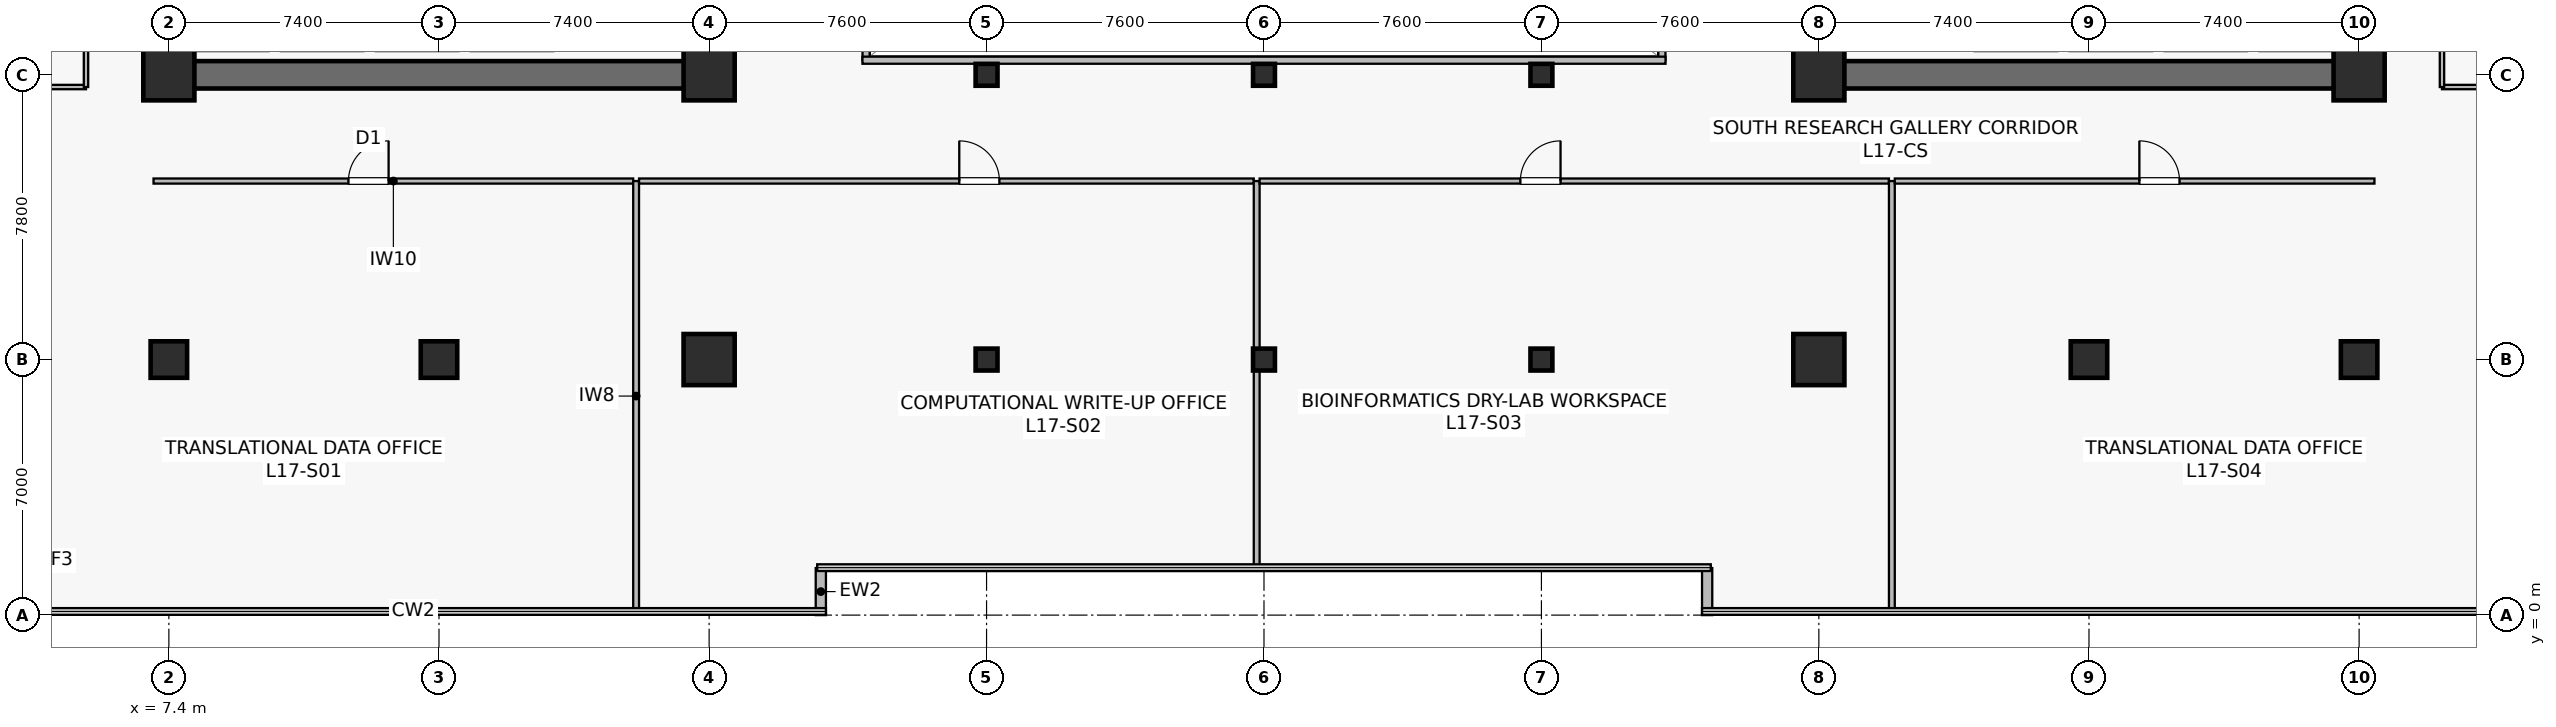
"""IFC4 building model, lengths in metres.
Left out: names, types, materials, properties, quantities, classifications, styles, units other than length and angle.
Written with IfcOpenShell. Run it as: python <this file> out.ifc"""

import sys

from ifc_helpers import new_model, si_unit, direction, frame, frame_2d, origin, origin_2d, place, context, subcontext, project, spatial, rectangle, hollow_rectangle, extrude, source, transform, mapped, element, fill, save


model = new_model("IFC4")
c1 = context("Model", 3, precision=1e-05, world=origin(), true_north=direction((0.0, 1.0)))
c2 = subcontext(c1, "Body", "Model", "MODEL_VIEW")
j1 = project(units=[si_unit("LENGTHUNIT", "METRE"), si_unit("PLANEANGLEUNIT", "RADIAN")], contexts=[c1])
p1 = place(None, origin())
s1 = spatial("IfcSite", under=j1, at=p1, CompositionType="ELEMENT")
p2 = place(p1, origin())
s2 = spatial("IfcBuilding", under=s1, at=p2, CompositionType="ELEMENT")
p3 = place(p2, frame((0.0, 0.0, 70.3)))
s3 = spatial("IfcBuildingStorey", under=s2, at=p3, CompositionType="ELEMENT", Elevation=70.3)
p4 = place(p3, frame((7.025, 14.8, 0.0), z_axis=(0.0, 0.0, 1.0), x_axis=(1.0, 0.0, 0.0)))
e1 = element("IfcWall", 1, at=p4, inside=s3, PredefinedType="SHEAR", context=c2, shape_type="SweptSolid", body=[
    extrude(rectangle(XDim=15.55, YDim=0.75, at=frame_2d((7.775, 0.0))), origin(), (0.0, 0.0, 1.0), 3.78),
])
p5 = place(p3, frame((7.4, 15.175, 0.0), z_axis=(0.0, 0.0, 1.0), x_axis=(0.0, 1.0, 0.0)))
e2 = element("IfcWall", 2, at=p5, inside=s3, PredefinedType="SHEAR", context=c2, shape_type="SweptSolid", body=[
    extrude(rectangle(XDim=18.25, YDim=0.75, at=frame_2d((9.125, 0.0))), origin(), (0.0, 0.0, 1.0), 3.78),
])
p6 = place(p3, frame((22.2, 15.175, 0.0), z_axis=(0.0, 0.0, 1.0), x_axis=(0.0, 1.0, 0.0)))
e3 = element("IfcWall", 3, at=p6, inside=s3, PredefinedType="SHEAR", context=c2, shape_type="SweptSolid", body=[
    extrude(rectangle(XDim=18.25, YDim=0.75, at=frame_2d((9.125, 0.0))), origin(), (0.0, 0.0, 1.0), 3.78),
])
p7 = place(p6, frame((3.375, 0.0, 0.0)))
e4 = element("IfcOpeningElement", 4, at=p7, cuts=e3, PredefinedType="OPENING", context=c2, shape_type="SweptSolid", body=[
    extrude(rectangle(XDim=1.42, YDim=2.2, at=frame_2d((0.71, 1.1))), frame((0.0, 0.385, 0.0), z_axis=(0.0, -1.0, 0.0), x_axis=(1.0, 0.0, 0.0)), (0.0, 0.0, 1.0), 0.77),
])
p8 = place(p3, frame((52.225, 14.8, 0.0), z_axis=(0.0, 0.0, 1.0), x_axis=(1.0, 0.0, 0.0)))
e5 = element("IfcWall", 5, at=p8, inside=s3, PredefinedType="SHEAR", context=c2, shape_type="SweptSolid", body=[
    extrude(rectangle(XDim=15.55, YDim=0.75, at=frame_2d((7.775, 0.0))), origin(), (0.0, 0.0, 1.0), 3.78),
])
p9 = place(p3, frame((52.6, 15.175, 0.0), z_axis=(0.0, 0.0, 1.0), x_axis=(0.0, 1.0, 0.0)))
e6 = element("IfcWall", 6, at=p9, inside=s3, PredefinedType="SHEAR", context=c2, shape_type="SweptSolid", body=[
    extrude(rectangle(XDim=18.25, YDim=0.75, at=frame_2d((9.125, 0.0))), origin(), (0.0, 0.0, 1.0), 3.78),
])
p10 = place(p9, frame((3.375, 0.0, 0.0)))
e7 = element("IfcOpeningElement", 7, at=p10, cuts=e6, PredefinedType="OPENING", context=c2, shape_type="SweptSolid", body=[
    extrude(rectangle(XDim=1.42, YDim=2.2, at=frame_2d((0.71, 1.1))), frame((0.0, 0.385, 0.0), z_axis=(0.0, -1.0, 0.0), x_axis=(1.0, 0.0, 0.0)), (0.0, 0.0, 1.0), 0.77),
])
p11 = place(p3, frame((67.4, 15.175, 0.0), z_axis=(0.0, 0.0, 1.0), x_axis=(0.0, 1.0, 0.0)))
e8 = element("IfcWall", 8, at=p11, inside=s3, PredefinedType="SHEAR", context=c2, shape_type="SweptSolid", body=[
    extrude(rectangle(XDim=18.25, YDim=0.75, at=frame_2d((9.125, 0.0))), origin(), (0.0, 0.0, 1.0), 3.78),
])
m1 = source(origin(), c2, "Body", "SweptSolid", [
    extrude(rectangle(XDim=1.0, YDim=1.0, at=origin_2d()), origin(), (0.0, 0.0, 1.0), 4.1),
])
p12 = place(p3, frame((14.8, 7.0, 0.0), z_axis=(0.0, 0.0, 1.0), x_axis=(1.0, 0.0, 0.0)))
e9 = element("IfcColumn", 9, at=p12, inside=s3, PredefinedType="COLUMN", context=c2, shape_type="MappedRepresentation", body=[
    mapped(m1, transform((0.0, 0.0, 0.0), scale=1.0)),
])
m2 = source(origin(), c2, "Body", "SweptSolid", [
    extrude(rectangle(XDim=1.4, YDim=1.4, at=origin_2d()), origin(), (0.0, 0.0, 1.0), 4.1),
])
for number, where, z_axis, x_axis in (
    (10, (22.2, 7.0, 0.0), (0.0, 0.0, 1.0), (1.0, 0.0, 0.0)),
    (11, (7.4, 14.8, 0.0), (0.0, 0.0, 1.0), (1.0, 0.0, 0.0)),
    (12, (22.2, 14.8, 0.0), (0.0, 0.0, 1.0), (1.0, 0.0, 0.0)),
    (13, (52.6, 7.0, 0.0), (0.0, 0.0, 1.0), (1.0, 0.0, 0.0)),
):
    element("IfcColumn", number, at=place(p3, frame(where, z_axis=z_axis, x_axis=x_axis)), inside=s3, PredefinedType="COLUMN", context=c2, shape_type="MappedRepresentation", body=[
        mapped(m2, transform((0.0, 0.0, 0.0), scale=1.0)),
    ])
p13 = place(p3, frame((60.0, 7.0, 0.0), z_axis=(0.0, 0.0, 1.0), x_axis=(1.0, 0.0, 0.0)))
e14 = element("IfcColumn", 14, at=p13, inside=s3, PredefinedType="COLUMN", context=c2, shape_type="MappedRepresentation", body=[
    mapped(m1, transform((0.0, 0.0, 0.0), scale=1.0)),
])
for number, where, z_axis, x_axis in (
    (15, (52.6, 14.8, 0.0), (0.0, 0.0, 1.0), (1.0, 0.0, 0.0)),
    (16, (67.4, 14.8, 0.0), (0.0, 0.0, 1.0), (1.0, 0.0, 0.0)),
):
    element("IfcColumn", number, at=place(p3, frame(where, z_axis=z_axis, x_axis=x_axis)), inside=s3, PredefinedType="COLUMN", context=c2, shape_type="MappedRepresentation", body=[
        mapped(m2, transform((0.0, 0.0, 0.0), scale=1.0)),
    ])
for number, where, z_axis, x_axis in (
    (17, (7.4, 7.0, 0.0), (0.0, 0.0, 1.0), (1.0, 0.0, 0.0)),
    (18, (67.4, 7.0, 0.0), (0.0, 0.0, 1.0), (1.0, 0.0, 0.0)),
):
    element("IfcColumn", number, at=place(p3, frame(where, z_axis=z_axis, x_axis=x_axis)), inside=s3, PredefinedType="COLUMN", context=c2, shape_type="MappedRepresentation", body=[
        mapped(m1, transform((0.0, 0.0, 0.0), scale=1.0)),
    ])
m3 = source(origin(), c2, "Body", "SweptSolid", [
    extrude(hollow_rectangle(XDim=0.6, YDim=0.6, WallThickness=0.028, at=origin_2d()), origin(), (0.0, 0.0, 1.0), 4.1),
])
for number, where, z_axis, x_axis in (
    (19, (29.8, 7.0, 0.0), (0.0, 0.0, 1.0), (1.0, 0.0, 0.0)),
    (20, (29.8, 14.8, 0.0), (0.0, 0.0, 1.0), (1.0, 0.0, 0.0)),
    (21, (37.4, 7.0, 0.0), (0.0, 0.0, 1.0), (1.0, 0.0, 0.0)),
    (22, (37.4, 14.8, 0.0), (0.0, 0.0, 1.0), (1.0, 0.0, 0.0)),
    (23, (45.0, 7.0, 0.0), (0.0, 0.0, 1.0), (1.0, 0.0, 0.0)),
    (24, (45.0, 14.8, 0.0), (0.0, 0.0, 1.0), (1.0, 0.0, 0.0)),
):
    element("IfcColumn", number, at=place(p3, frame(where, z_axis=z_axis, x_axis=x_axis)), inside=s3, PredefinedType="COLUMN", context=c2, shape_type="MappedRepresentation", body=[
        mapped(m3, transform((0.0, 0.0, 0.0), scale=1.0)),
    ])
for number, where, z_axis, x_axis in (
    (25, (25.26, 0.0, 0.0), (0.0, 0.0, 1.0), (0.0, 1.0, 0.0)),
    (26, (49.54, 1.288, 0.0), (0.0, 0.0, 1.0), (0.0, -1.0, 0.0)),
):
    element("IfcWall", number, at=place(p3, frame(where, z_axis=z_axis, x_axis=x_axis)), inside=s3, PredefinedType="STANDARD", context=c2, shape_type="SweptSolid", body=[
        extrude(rectangle(XDim=1.288, YDim=0.28, at=frame_2d((0.644, 0.0))), origin(), (0.0, 0.0, 1.0), 3.78),
    ])
p14 = place(p3, frame((26.5, 15.2, 0.0), z_axis=(0.0, 0.0, 1.0), x_axis=(0.0, 1.0, 0.0)))
e27 = element("IfcWall", 27, at=p14, inside=s3, PredefinedType="SOLIDWALL", context=c2, shape_type="SweptSolid", body=[
    extrude(rectangle(XDim=18.2, YDim=0.195, at=frame_2d((9.1, 0.0))), origin(), (0.0, 0.0, 1.0), 3.78),
])
p15 = place(p14, frame((1.8, 0.0, 0.9)))
e28 = element("IfcOpeningElement", 28, at=p15, cuts=e27, PredefinedType="OPENING", context=c2, shape_type="SweptSolid", body=[
    extrude(rectangle(XDim=1.2, YDim=1.35, at=frame_2d((0.6, 0.675))), frame((0.0, 0.107, 0.0), z_axis=(0.0, -1.0, 0.0), x_axis=(1.0, 0.0, 0.0)), (0.0, 0.0, 1.0), 0.215),
])
p16 = place(p14, frame((13.2, 0.0, 0.9)))
e29 = element("IfcOpeningElement", 29, at=p16, cuts=e27, PredefinedType="OPENING", context=c2, shape_type="SweptSolid", body=[
    extrude(rectangle(XDim=1.2, YDim=1.35, at=frame_2d((0.6, 0.675))), frame((0.0, 0.107, 0.0), z_axis=(0.0, -1.0, 0.0), x_axis=(1.0, 0.0, 0.0)), (0.0, 0.0, 1.0), 0.215),
])
p17 = place(p3, frame((48.3, 15.2, 0.0), z_axis=(0.0, 0.0, 1.0), x_axis=(0.0, 1.0, 0.0)))
e30 = element("IfcWall", 30, at=p17, inside=s3, PredefinedType="SOLIDWALL", context=c2, shape_type="SweptSolid", body=[
    extrude(rectangle(XDim=18.2, YDim=0.195, at=frame_2d((9.1, 0.0))), origin(), (0.0, 0.0, 1.0), 3.78),
])
p18 = place(p17, frame((1.8, 0.0, 0.9)))
e31 = element("IfcOpeningElement", 31, at=p18, cuts=e30, PredefinedType="OPENING", context=c2, shape_type="SweptSolid", body=[
    extrude(rectangle(XDim=1.2, YDim=1.35, at=frame_2d((0.6, 0.675))), frame((0.0, 0.107, 0.0), z_axis=(0.0, -1.0, 0.0), x_axis=(1.0, 0.0, 0.0)), (0.0, 0.0, 1.0), 0.215),
])
p19 = place(p17, frame((13.2, 0.0, 0.9)))
e32 = element("IfcOpeningElement", 32, at=p19, cuts=e30, PredefinedType="OPENING", context=c2, shape_type="SweptSolid", body=[
    extrude(rectangle(XDim=1.2, YDim=1.35, at=frame_2d((0.6, 0.675))), frame((0.0, 0.107, 0.0), z_axis=(0.0, -1.0, 0.0), x_axis=(1.0, 0.0, 0.0)), (0.0, 0.0, 1.0), 0.215),
])
p20 = place(p3, frame((26.4, 15.2, 0.0), z_axis=(0.0, 0.0, 1.0), x_axis=(1.0, 0.0, 0.0)))
e33 = element("IfcWall", 33, at=p20, inside=s3, PredefinedType="SOLIDWALL", context=c2, shape_type="SweptSolid", body=[
    extrude(rectangle(XDim=22.0, YDim=0.195, at=frame_2d((11.0, 0.0))), origin(), (0.0, 0.0, 1.0), 3.78),
])
p21 = place(p3, frame((6.98, 11.89, 0.0), z_axis=(0.0, 0.0, 1.0), x_axis=(1.0, 0.0, 0.0)))
e34 = element("IfcWall", 34, at=p21, inside=s3, PredefinedType="PARTITIONING", context=c2, shape_type="SweptSolid", body=[
    extrude(rectangle(XDim=13.14, YDim=0.14, at=frame_2d((6.57, 0.0))), origin(), (0.0, 0.0, 1.0), 3.115),
])
p22 = place(p21, frame((5.34, 0.0, 0.0)))
e35 = element("IfcOpeningElement", 35, at=p22, cuts=e34, PredefinedType="OPENING", context=c2, shape_type="SweptSolid", body=[
    extrude(rectangle(XDim=1.1, YDim=2.18, at=frame_2d((0.55, 1.09))), frame((0.0, 0.08, 0.0), z_axis=(0.0, -1.0, 0.0), x_axis=(1.0, 0.0, 0.0)), (0.0, 0.0, 1.0), 0.16),
])
p23 = place(p3, frame((20.2, 0.11, 0.0), z_axis=(0.0, 0.0, 1.0), x_axis=(0.0, 1.0, 0.0)))
e36 = element("IfcWall", 36, at=p23, inside=s3, PredefinedType="PARTITIONING", context=c2, shape_type="SweptSolid", body=[
    extrude(rectangle(XDim=11.78, YDim=0.16, at=frame_2d((5.89, 0.0))), origin(), (0.0, 0.0, 1.0), 3.015),
])
p24 = place(p3, frame((20.28, 11.89, 0.0), z_axis=(0.0, 0.0, 1.0), x_axis=(1.0, 0.0, 0.0)))
e37 = element("IfcWall", 37, at=p24, inside=s3, PredefinedType="PARTITIONING", context=c2, shape_type="SweptSolid", body=[
    extrude(rectangle(XDim=16.84, YDim=0.14, at=frame_2d((8.42, 0.0))), origin(), (0.0, 0.0, 1.0), 3.115),
])
p25 = place(p24, frame((8.772, 0.0, 0.0)))
e38 = element("IfcOpeningElement", 38, at=p25, cuts=e37, PredefinedType="OPENING", context=c2, shape_type="SweptSolid", body=[
    extrude(rectangle(XDim=1.1, YDim=2.18, at=frame_2d((0.55, 1.09))), frame((0.0, 0.08, 0.0), z_axis=(0.0, -1.0, 0.0), x_axis=(1.0, 0.0, 0.0)), (0.0, 0.0, 1.0), 0.16),
])
p26 = place(p3, frame((37.2, 1.31, 0.0), z_axis=(0.0, 0.0, 1.0), x_axis=(0.0, 1.0, 0.0)))
e39 = element("IfcWall", 39, at=p26, inside=s3, PredefinedType="PARTITIONING", context=c2, shape_type="SweptSolid", body=[
    extrude(rectangle(XDim=10.58, YDim=0.16, at=frame_2d((5.29, 0.0))), origin(), (0.0, 0.0, 1.0), 3.015),
])
p27 = place(p3, frame((37.28, 11.89, 0.0), z_axis=(0.0, 0.0, 1.0), x_axis=(1.0, 0.0, 0.0)))
e40 = element("IfcWall", 40, at=p27, inside=s3, PredefinedType="PARTITIONING", context=c2, shape_type="SweptSolid", body=[
    extrude(rectangle(XDim=17.24, YDim=0.14, at=frame_2d((8.62, 0.0))), origin(), (0.0, 0.0, 1.0), 3.115),
])
p28 = place(p27, frame((7.144, 0.0, 0.0)))
e41 = element("IfcOpeningElement", 41, at=p28, cuts=e40, PredefinedType="OPENING", context=c2, shape_type="SweptSolid", body=[
    extrude(rectangle(XDim=1.1, YDim=2.18, at=frame_2d((0.55, 1.09))), frame((0.0, 0.08, 0.0), z_axis=(0.0, -1.0, 0.0), x_axis=(1.0, 0.0, 0.0)), (0.0, 0.0, 1.0), 0.16),
])
p29 = place(p3, frame((54.6, 0.11, 0.0), z_axis=(0.0, 0.0, 1.0), x_axis=(0.0, 1.0, 0.0)))
e42 = element("IfcWall", 42, at=p29, inside=s3, PredefinedType="PARTITIONING", context=c2, shape_type="SweptSolid", body=[
    extrude(rectangle(XDim=11.78, YDim=0.16, at=frame_2d((5.89, 0.0))), origin(), (0.0, 0.0, 1.0), 3.015),
])
p30 = place(p3, frame((54.68, 11.89, 0.0), z_axis=(0.0, 0.0, 1.0), x_axis=(1.0, 0.0, 0.0)))
e43 = element("IfcWall", 43, at=p30, inside=s3, PredefinedType="PARTITIONING", context=c2, shape_type="SweptSolid", body=[
    extrude(rectangle(XDim=13.14, YDim=0.14, at=frame_2d((6.57, 0.0))), origin(), (0.0, 0.0, 1.0), 3.115),
])
p31 = place(p30, frame((6.7, 0.0, 0.0)))
e44 = element("IfcOpeningElement", 44, at=p31, cuts=e43, PredefinedType="OPENING", context=c2, shape_type="SweptSolid", body=[
    extrude(rectangle(XDim=1.1, YDim=2.18, at=frame_2d((0.55, 1.09))), frame((0.0, 0.08, 0.0), z_axis=(0.0, -1.0, 0.0), x_axis=(1.0, 0.0, 0.0)), (0.0, 0.0, 1.0), 0.16),
])
p32 = place(p3, frame((0.11, 14.465, 0.0), z_axis=(0.0, 0.0, 1.0), x_axis=(1.0, 0.0, 0.0)))
e45 = element("IfcWall", 45, at=p32, inside=s3, PredefinedType="PARTITIONING", context=c2, shape_type="SweptSolid", body=[
    extrude(rectangle(XDim=5.02, YDim=0.12, at=frame_2d((2.51, 0.0))), origin(), (0.0, 0.0, 1.0), 3.78),
])
p33 = place(p3, frame((5.13, 14.465, 0.0), z_axis=(0.0, 0.0, 1.0), x_axis=(0.0, 1.0, 0.0)))
e46 = element("IfcWall", 46, at=p33, inside=s3, PredefinedType="PARTITIONING", context=c2, shape_type="SweptSolid", body=[
    extrude(rectangle(XDim=19.67, YDim=0.12, at=frame_2d((9.835, 0.0))), origin(), (0.0, 0.0, 1.0), 3.78),
])
p34 = place(p33, frame((9.385, 0.0, 0.0)))
e47 = element("IfcOpeningElement", 47, at=p34, cuts=e46, PredefinedType="OPENING", context=c2, shape_type="SweptSolid", body=[
    extrude(rectangle(XDim=0.9, YDim=2.1, at=frame_2d((0.45, 1.05))), frame((0.0, 0.07, 0.0), z_axis=(0.0, -1.0, 0.0), x_axis=(1.0, 0.0, 0.0)), (0.0, 0.0, 1.0), 0.14),
])
p35 = place(p3, frame((69.67, 14.465, 0.0), z_axis=(0.0, 0.0, 1.0), x_axis=(1.0, 0.0, 0.0)))
e48 = element("IfcWall", 48, at=p35, inside=s3, PredefinedType="PARTITIONING", context=c2, shape_type="SweptSolid", body=[
    extrude(rectangle(XDim=5.02, YDim=0.12, at=frame_2d((2.51, 0.0))), origin(), (0.0, 0.0, 1.0), 3.78),
])
p36 = place(p3, frame((69.67, 14.465, 0.0), z_axis=(0.0, 0.0, 1.0), x_axis=(0.0, 1.0, 0.0)))
e49 = element("IfcWall", 49, at=p36, inside=s3, PredefinedType="PARTITIONING", context=c2, shape_type="SweptSolid", body=[
    extrude(rectangle(XDim=7.275, YDim=0.12, at=frame_2d((3.637, 0.0))), origin(), (0.0, 0.0, 1.0), 3.78),
])
p37 = place(p36, frame((3.188, 0.0, 0.0)))
e50 = element("IfcOpeningElement", 50, at=p37, cuts=e49, PredefinedType="OPENING", context=c2, shape_type="SweptSolid", body=[
    extrude(rectangle(XDim=0.9, YDim=2.1, at=frame_2d((0.45, 1.05))), frame((0.0, 0.07, 0.0), z_axis=(0.0, -1.0, 0.0), x_axis=(1.0, 0.0, 0.0)), (0.0, 0.0, 1.0), 0.14),
])
m4 = source(origin(), c2, "Body", "SweptSolid", [
    extrude(rectangle(XDim=1.1, YDim=2.18, at=frame_2d((0.55, 1.09))), frame((0.0, 0.025, 0.0), z_axis=(0.0, -1.0, 0.0), x_axis=(1.0, 0.0, 0.0)), (0.0, 0.0, 1.0), 0.05),
])
p38 = place(p22, origin())
e51 = element("IfcDoor", 51, at=p38, inside=s3, OperationType="SINGLE_SWING_RIGHT", PredefinedType="DOOR", context=c2, shape_type="MappedRepresentation", body=[
    mapped(m4, transform((0.0, 0.0, 0.0), scale=1.0)),
])
fill(e35, e51)
p39 = place(p25, origin())
e52 = element("IfcDoor", 52, at=p39, inside=s3, OperationType="SINGLE_SWING_LEFT", PredefinedType="DOOR", context=c2, shape_type="MappedRepresentation", body=[
    mapped(m4, transform((0.0, 0.0, 0.0), scale=1.0)),
])
fill(e38, e52)
p40 = place(p28, origin())
e53 = element("IfcDoor", 53, at=p40, inside=s3, OperationType="SINGLE_SWING_RIGHT", PredefinedType="DOOR", context=c2, shape_type="MappedRepresentation", body=[
    mapped(m4, transform((0.0, 0.0, 0.0), scale=1.0)),
])
fill(e41, e53)
p41 = place(p31, origin())
e54 = element("IfcDoor", 54, at=p41, inside=s3, OperationType="SINGLE_SWING_LEFT", PredefinedType="DOOR", context=c2, shape_type="MappedRepresentation", body=[
    mapped(m4, transform((0.0, 0.0, 0.0), scale=1.0)),
])
fill(e44, e54)
save(model, sys.argv[1])
